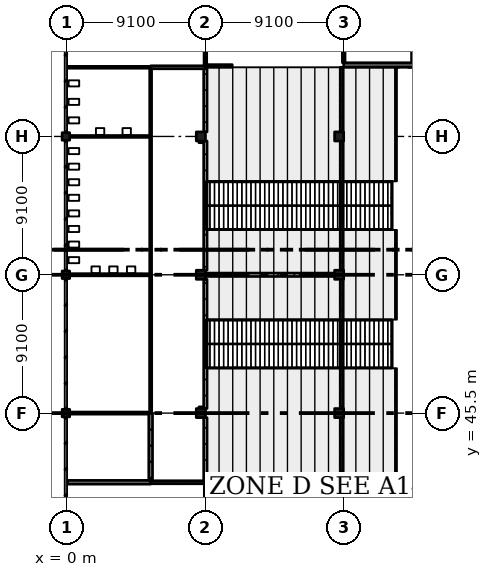
"""IFC4 building model, lengths in metres.
Left out: names, types, materials, properties, quantities, classifications, styles, units other than length and angle.
Written with IfcOpenShell. Run it as: python <this file> out.ifc"""

import sys

from ifc_helpers import new_model, si_unit, direction, frame, frame_2d, origin, origin_2d, place, context, subcontext, project, spatial, rectangle, extrude, element, fill, save


model = new_model("IFC4")
c1 = context("Model", 3, precision=1e-05, world=origin(), true_north=direction((0.0, 1.0)))
c2 = subcontext(c1, "Body", "Model", "MODEL_VIEW")
j1 = project(units=[si_unit("LENGTHUNIT", "METRE"), si_unit("PLANEANGLEUNIT", "RADIAN")], contexts=[c1])
p1 = place(None, origin())
s1 = spatial("IfcSite", under=j1, at=p1, CompositionType="ELEMENT")
p2 = place(p1, origin())
s2 = spatial("IfcBuilding", under=s1, at=p2, CompositionType="ELEMENT")
p3 = place(p2, frame((0.0, 0.0, 15.47)))
s3 = spatial("IfcBuildingStorey", under=s2, at=p3, CompositionType="ELEMENT", Elevation=15.47)
for number, where, z_axis, x_axis in (
    (1, (-0.075, 45.5, 0.0), (0.0, 0.0, 1.0), (1.0, 0.0, 0.0)),
    (2, (-0.075, 54.6, 0.0), (0.0, 0.0, 1.0), (1.0, 0.0, 0.0)),
    (3, (-0.075, 63.7, 0.0), (0.0, 0.0, 1.0), (1.0, 0.0, 0.0)),
):
    element("IfcColumn", number, at=place(p3, frame(where, z_axis=z_axis, x_axis=x_axis)), inside=s3, PredefinedType="COLUMN", context=c2, shape_type="SweptSolid", body=[
        extrude(rectangle(XDim=0.5, YDim=0.5, at=origin_2d()), origin(), (0.0, 0.0, 1.0), 4.55),
    ])
for number, where, z_axis, x_axis in (
    (4, (8.8, 45.5, 0.0), (0.0, 0.0, 1.0), (1.0, 0.0, 0.0)),
    (5, (8.8, 54.6, 0.0), (0.0, 0.0, 1.0), (1.0, 0.0, 0.0)),
    (6, (8.8, 63.7, 0.0), (0.0, 0.0, 1.0), (1.0, 0.0, 0.0)),
):
    element("IfcColumn", number, at=place(p3, frame(where, z_axis=z_axis, x_axis=x_axis)), inside=s3, PredefinedType="COLUMN", context=c2, shape_type="SweptSolid", body=[
        extrude(rectangle(XDim=0.6, YDim=0.6, at=origin_2d()), origin(), (0.0, 0.0, 1.0), 4.55),
    ])
for number, where, z_axis, x_axis in (
    (7, (17.9, 45.5, 0.0), (0.0, 0.0, 1.0), (1.0, 0.0, 0.0)),
    (8, (17.9, 54.6, 0.0), (0.0, 0.0, 1.0), (1.0, 0.0, 0.0)),
    (9, (17.9, 63.7, 0.0), (0.0, 0.0, 1.0), (1.0, 0.0, 0.0)),
):
    element("IfcColumn", number, at=place(p3, frame(where, z_axis=z_axis, x_axis=x_axis)), inside=s3, PredefinedType="COLUMN", context=c2, shape_type="SweptSolid", body=[
        extrude(rectangle(XDim=0.6, YDim=0.6, at=origin_2d()), origin(), (0.0, 0.0, 1.0), 2.71),
    ])
for number, where, z_axis, x_axis in (
    (10, (40.95, 40.8, 0.0), (0.0, 0.0, 1.0), (-1.0, 0.0, 0.0)),
    (11, (40.95, 68.4, 0.0), (0.0, 0.0, 1.0), (-1.0, 0.0, 0.0)),
):
    element("IfcWall", number, at=place(p3, frame(where, z_axis=z_axis, x_axis=x_axis)), inside=s3, PredefinedType="SHEAR", context=c2, shape_type="SweptSolid", body=[
        extrude(rectangle(XDim=22.75, YDim=0.3, at=frame_2d((11.375, 0.0))), origin(), (0.0, 0.0, 1.0), 4.55),
    ])
p4 = place(p3, frame((0.03, 40.95, 0.0), z_axis=(0.0, 0.0, 1.0), x_axis=(1.0, 0.0, 0.0)))
e12 = element("IfcWall", 12, at=p4, inside=s3, PredefinedType="SOLIDWALL", context=c2, shape_type="SweptSolid", body=[
    extrude(rectangle(XDim=5.47, YDim=0.25, at=frame_2d((2.735, 0.0))), origin(), (0.0, 0.0, 1.0), 4.3),
])
p5 = place(p3, frame((0.175, 45.5, 0.0), z_axis=(0.0, 0.0, 1.0), x_axis=(1.0, 0.0, 0.0)))
e13 = element("IfcWall", 13, at=p5, inside=s3, PredefinedType="SOLIDWALL", context=c2, shape_type="SweptSolid", body=[
    extrude(rectangle(XDim=5.2, YDim=0.14, at=frame_2d((2.6, 0.0))), origin(), (0.0, 0.0, 1.0), 3.6),
])
p6 = place(p3, frame((0.175, 54.6, 0.0), z_axis=(0.0, 0.0, 1.0), x_axis=(1.0, 0.0, 0.0)))
e14 = element("IfcWall", 14, at=p6, inside=s3, PredefinedType="SOLIDWALL", context=c2, shape_type="SweptSolid", body=[
    extrude(rectangle(XDim=5.255, YDim=0.14, at=frame_2d((2.627, 0.0))), origin(), (0.0, 0.0, 1.0), 3.6),
])
p7 = place(p3, frame((0.175, 63.7, 0.0), z_axis=(0.0, 0.0, 1.0), x_axis=(1.0, 0.0, 0.0)))
e15 = element("IfcWall", 15, at=p7, inside=s3, PredefinedType="PARTITIONING", context=c2, shape_type="SweptSolid", body=[
    extrude(rectangle(XDim=5.262, YDim=0.125, at=frame_2d((2.631, 0.0))), origin(), (0.0, 0.0, 1.0), 3.6),
])
p8 = place(p3, frame((5.5, 40.95, 0.0), z_axis=(0.0, 0.0, 1.0), x_axis=(1.0, 0.0, 0.0)))
e16 = element("IfcWall", 16, at=p8, inside=s3, PredefinedType="PARTITIONING", context=c2, shape_type="SweptSolid", body=[
    extrude(rectangle(XDim=3.6, YDim=0.2, at=frame_2d((1.8, 0.0))), origin(), (0.0, 0.0, 1.0), 4.3),
])
p9 = place(p8, frame((0.55, 0.0, 0.0)))
e17 = element("IfcOpeningElement", 17, at=p9, cuts=e16, PredefinedType="OPENING", context=c2, shape_type="SweptSolid", body=[
    extrude(rectangle(XDim=2.4, YDim=2.4, at=frame_2d((1.2, 1.2))), frame((0.0, 0.11, 0.0), z_axis=(0.0, -1.0, 0.0), x_axis=(1.0, 0.0, 0.0)), (0.0, 0.0, 1.0), 0.22),
])
p10 = place(p3, frame((5.5, 41.075, 0.0), z_axis=(0.0, 0.0, 1.0), x_axis=(0.0, 1.0, 0.0)))
e18 = element("IfcWall", 18, at=p10, inside=s3, PredefinedType="SOLIDWALL", context=c2, shape_type="SweptSolid", body=[
    extrude(rectangle(XDim=4.425, YDim=0.25, at=frame_2d((2.212, 0.0))), origin(), (0.0, 0.0, 1.0), 4.3),
])
p11 = place(p10, frame((1.75, 0.0, 0.0)))
e19 = element("IfcOpeningElement", 19, at=p11, cuts=e18, PredefinedType="OPENING", context=c2, shape_type="SweptSolid", body=[
    extrude(rectangle(XDim=1.0, YDim=2.1, at=frame_2d((0.5, 1.05))), frame((0.0, 0.135, 0.0), z_axis=(0.0, -1.0, 0.0), x_axis=(1.0, 0.0, 0.0)), (0.0, 0.0, 1.0), 0.27),
])
p12 = place(p3, frame((5.5, 45.5, 0.0), z_axis=(0.0, 0.0, 1.0), x_axis=(0.0, 1.0, 0.0)))
e20 = element("IfcWall", 20, at=p12, inside=s3, PredefinedType="SOLIDWALL", context=c2, shape_type="SweptSolid", body=[
    extrude(rectangle(XDim=9.1, YDim=0.14, at=frame_2d((4.55, 0.0))), origin(), (0.0, 0.0, 1.0), 4.3),
])
p13 = place(p12, frame((3.75, 0.0, 0.0)))
e21 = element("IfcOpeningElement", 21, at=p13, cuts=e20, PredefinedType="OPENING", context=c2, shape_type="SweptSolid", body=[
    extrude(rectangle(XDim=1.5, YDim=2.1, at=frame_2d((0.75, 1.05))), frame((0.0, 0.08, 0.0), z_axis=(0.0, -1.0, 0.0), x_axis=(1.0, 0.0, 0.0)), (0.0, 0.0, 1.0), 0.16),
])
p14 = place(p3, frame((5.5, 54.6, 0.0), z_axis=(0.0, 0.0, 1.0), x_axis=(0.0, 1.0, 0.0)))
e22 = element("IfcWall", 22, at=p14, inside=s3, PredefinedType="PARTITIONING", context=c2, shape_type="SweptSolid", body=[
    extrude(rectangle(XDim=13.55, YDim=0.125, at=frame_2d((6.775, 0.0))), origin(), (0.0, 0.0, 1.0), 4.3),
])
p15 = place(p14, frame((4.05, 0.0, 0.0)))
e23 = element("IfcOpeningElement", 23, at=p15, cuts=e22, PredefinedType="OPENING", context=c2, shape_type="SweptSolid", body=[
    extrude(rectangle(XDim=0.9, YDim=2.1, at=frame_2d((0.45, 1.05))), frame((0.0, 0.073, 0.0), z_axis=(0.0, -1.0, 0.0), x_axis=(1.0, 0.0, 0.0)), (0.0, 0.0, 1.0), 0.145),
])
p16 = place(p14, frame((10.85, 0.0, 0.0)))
e24 = element("IfcOpeningElement", 24, at=p16, cuts=e22, PredefinedType="OPENING", context=c2, shape_type="SweptSolid", body=[
    extrude(rectangle(XDim=0.9, YDim=2.1, at=frame_2d((0.45, 1.05))), frame((0.0, 0.073, 0.0), z_axis=(0.0, -1.0, 0.0), x_axis=(1.0, 0.0, 0.0)), (0.0, 0.0, 1.0), 0.145),
])
p17 = place(p3, frame((5.5, 68.25, 0.0), z_axis=(0.0, 0.0, 1.0), x_axis=(-1.0, 0.0, 0.0)))
e25 = element("IfcWall", 25, at=p17, inside=s3, PredefinedType="PARTITIONING", context=c2, shape_type="SweptSolid", body=[
    extrude(rectangle(XDim=5.47, YDim=0.125, at=frame_2d((2.735, 0.0))), origin(), (0.0, 0.0, 1.0), 4.3),
])
for number, where, z_axis, x_axis in (
    (26, (8.675, 63.4, 0.0), (0.0, 0.0, 1.0), (1.0, 0.0, 0.0)),
    (27, (8.975, 45.8, 0.0), (0.0, 0.0, 1.0), (-1.0, 0.0, 0.0)),
):
    element("IfcWall", number, at=place(p3, frame(where, z_axis=z_axis, x_axis=x_axis)), inside=s3, PredefinedType="PARTITIONING", context=c2, shape_type="SweptSolid", body=[
        extrude(rectangle(XDim=0.3, YDim=0.225, at=frame_2d((0.15, 0.0))), origin(), (0.0, 0.0, 1.0), 4.3),
    ])
p18 = place(p3, frame((9.1, 36.75, 0.0), z_axis=(0.0, 0.0, 1.0), x_axis=(0.0, 1.0, 0.0)))
e28 = element("IfcWall", 28, at=p18, inside=s3, PredefinedType="SOLIDWALL", context=c2, shape_type="SweptSolid", body=[
    extrude(rectangle(XDim=4.1, YDim=0.14, at=frame_2d((2.05, 0.0))), origin(), (0.0, 0.0, 1.0), 3.55),
])
p19 = place(p3, frame((9.1, 40.879, 0.0), z_axis=(0.0, 0.0, 1.0), x_axis=(1.0, 0.0, 0.0)))
e29 = element("IfcWall", 29, at=p19, inside=s3, PredefinedType="SOLIDWALL", context=c2, shape_type="SweptSolid", body=[
    extrude(rectangle(XDim=1.77, YDim=0.14, at=frame_2d((0.885, 0.0))), origin(), (0.0, 0.0, 1.0), 4.3),
])
p20 = place(p3, frame((9.1, 45.2, 0.0), z_axis=(0.0, 0.0, 1.0), x_axis=(0.0, -1.0, 0.0)))
e30 = element("IfcWall", 30, at=p20, inside=s3, PredefinedType="PARTITIONING", context=c2, shape_type="SweptSolid", body=[
    extrude(rectangle(XDim=4.15, YDim=0.225, at=frame_2d((2.075, 0.0))), origin(), (0.0, 0.0, 1.0), 3.55),
])
p21 = place(p3, frame((9.1, 54.3, 0.0), z_axis=(0.0, 0.0, 1.0), x_axis=(0.0, -1.0, 0.0)))
e31 = element("IfcWall", 31, at=p21, inside=s3, PredefinedType="PARTITIONING", context=c2, shape_type="SweptSolid", body=[
    extrude(rectangle(XDim=8.5, YDim=0.225, at=frame_2d((4.25, 0.0))), origin(), (0.0, 0.0, 1.0), 3.55),
])
p22 = place(p21, frame((3.75, 0.0, 0.0)))
e32 = element("IfcOpeningElement", 32, at=p22, cuts=e31, PredefinedType="OPENING", context=c2, shape_type="SweptSolid", body=[
    extrude(rectangle(XDim=1.0, YDim=2.4, at=frame_2d((0.5, 1.2))), frame((0.0, 0.123, 0.0), z_axis=(0.0, -1.0, 0.0), x_axis=(1.0, 0.0, 0.0)), (0.0, 0.0, 1.0), 0.245),
])
p23 = place(p3, frame((9.1, 54.6, 0.0), z_axis=(0.0, 0.0, 1.0), x_axis=(1.0, 0.0, 0.0)))
e33 = element("IfcWall", 33, at=p23, inside=s3, PredefinedType="PARTITIONING", context=c2, shape_type="SweptSolid", body=[
    extrude(rectangle(XDim=1.77, YDim=0.225, at=frame_2d((0.885, 0.0))), origin(), (0.0, 0.0, 1.0), 3.22),
])
p24 = place(p3, frame((9.1, 63.4, 0.0), z_axis=(0.0, 0.0, 1.0), x_axis=(0.0, -1.0, 0.0)))
e34 = element("IfcWall", 34, at=p24, inside=s3, PredefinedType="PARTITIONING", context=c2, shape_type="SweptSolid", body=[
    extrude(rectangle(XDim=8.5, YDim=0.225, at=frame_2d((4.25, 0.0))), origin(), (0.0, 0.0, 1.0), 3.55),
])
p25 = place(p24, frame((3.75, 0.0, 0.0)))
e35 = element("IfcOpeningElement", 35, at=p25, cuts=e34, PredefinedType="OPENING", context=c2, shape_type="SweptSolid", body=[
    extrude(rectangle(XDim=1.0, YDim=2.4, at=frame_2d((0.5, 1.2))), frame((0.0, 0.123, 0.0), z_axis=(0.0, -1.0, 0.0), x_axis=(1.0, 0.0, 0.0)), (0.0, 0.0, 1.0), 0.245),
])
p26 = place(p3, frame((9.1, 68.15, 0.0), z_axis=(0.0, 0.0, 1.0), x_axis=(0.0, -1.0, 0.0)))
e36 = element("IfcWall", 36, at=p26, inside=s3, PredefinedType="PARTITIONING", context=c2, shape_type="SweptSolid", body=[
    extrude(rectangle(XDim=4.15, YDim=0.225, at=frame_2d((2.075, 0.0))), origin(), (0.0, 0.0, 1.0), 3.55),
])
p27 = place(p3, frame((9.1, 68.25, 0.0), z_axis=(0.0, 0.0, 1.0), x_axis=(-1.0, 0.0, 0.0)))
e37 = element("IfcWall", 37, at=p27, inside=s3, PredefinedType="PARTITIONING", context=c2, shape_type="SweptSolid", body=[
    extrude(rectangle(XDim=3.6, YDim=0.2, at=frame_2d((1.8, 0.0))), origin(), (0.0, 0.0, 1.0), 4.3),
])
p28 = place(p27, frame((0.55, 0.0, 0.0)))
e38 = element("IfcOpeningElement", 38, at=p28, cuts=e37, PredefinedType="OPENING", context=c2, shape_type="SweptSolid", body=[
    extrude(rectangle(XDim=2.4, YDim=2.4, at=frame_2d((1.2, 1.2))), frame((0.0, 0.11, 0.0), z_axis=(0.0, -1.0, 0.0), x_axis=(1.0, 0.0, 0.0)), (0.0, 0.0, 1.0), 0.22),
])
p29 = place(p3, frame((9.1, 68.35, 0.0), z_axis=(0.0, 0.0, 1.0), x_axis=(0.0, 1.0, 0.0)))
e39 = element("IfcWall", 39, at=p29, inside=s3, PredefinedType="PARTITIONING", context=c2, shape_type="SweptSolid", body=[
    extrude(rectangle(XDim=4.1, YDim=0.175, at=frame_2d((2.05, 0.0))), origin(), (0.0, 0.0, 1.0), 3.55),
])
p30 = place(p3, frame((10.87, 68.338, 0.0), z_axis=(0.0, 0.0, 1.0), x_axis=(-1.0, 0.0, 0.0)))
e40 = element("IfcWall", 40, at=p30, inside=s3, PredefinedType="PARTITIONING", context=c2, shape_type="SweptSolid", body=[
    extrude(rectangle(XDim=1.77, YDim=0.175, at=frame_2d((0.885, 0.0))), origin(), (0.0, 0.0, 1.0), 4.3),
])
p31 = place(p3, frame((10.93, 54.6, 0.0), z_axis=(0.0, 0.0, 1.0), x_axis=(1.0, 0.0, 0.0)))
e41 = element("IfcWall", 41, at=p31, inside=s3, PredefinedType="PARTITIONING", context=c2, shape_type="SweptSolid", body=[
    extrude(rectangle(XDim=6.67, YDim=0.225, at=frame_2d((3.335, 0.0))), origin(), (0.0, 0.0, 1.0), 3.22),
])
p32 = place(p3, frame((18.2, 72.4, 0.0), z_axis=(0.0, 0.0, 1.0), x_axis=(0.0, -1.0, 0.0)))
e42 = element("IfcWall", 42, at=p32, inside=s3, PredefinedType="PARTITIONING", context=c2, shape_type="SweptSolid", body=[
    extrude(rectangle(XDim=3.85, YDim=0.175, at=frame_2d((1.925, 0.0))), origin(), (0.0, 0.0, 1.0), 4.3),
])
p33 = place(p3, frame((22.75, 40.65, 0.0), z_axis=(0.0, 0.0, 1.0), x_axis=(0.0, -1.0, 0.0)))
e43 = element("IfcWall", 43, at=p33, inside=s3, PredefinedType="SOLIDWALL", context=c2, shape_type="SweptSolid", body=[
    extrude(rectangle(XDim=4.25, YDim=0.14, at=frame_2d((2.125, 0.0))), origin(), (0.0, 0.0, 1.0), 4.3),
])
p34 = place(p3, frame((18.07, 54.3, 0.0), z_axis=(0.0, 0.0, 1.0), x_axis=(0.0, -1.0, 0.0)))
e44 = element("IfcWall", 44, at=p34, inside=s3, PredefinedType="PARTITIONING", context=c2, shape_type="SweptSolid", body=[
    extrude(rectangle(XDim=8.5, YDim=0.2, at=frame_2d((4.25, 0.0))), origin(), (0.0, 0.0, 1.0), 2.71),
])
p35 = place(p34, frame((1.25, 0.0, 1.1)))
e45 = element("IfcOpeningElement", 45, at=p35, cuts=e44, PredefinedType="OPENING", context=c2, shape_type="SweptSolid", body=[
    extrude(rectangle(XDim=6.0, YDim=1.3, at=frame_2d((3.0, 0.65))), frame((0.0, 0.11, 0.0), z_axis=(0.0, -1.0, 0.0), x_axis=(1.0, 0.0, 0.0)), (0.0, 0.0, 1.0), 0.22),
])
p36 = place(p3, frame((18.07, 45.2, 0.0), z_axis=(0.0, 0.0, 1.0), x_axis=(0.0, -1.0, 0.0)))
e46 = element("IfcWall", 46, at=p36, inside=s3, PredefinedType="PARTITIONING", context=c2, shape_type="SweptSolid", body=[
    extrude(rectangle(XDim=4.25, YDim=0.2, at=frame_2d((2.125, 0.0))), origin(), (0.0, 0.0, 1.0), 2.91),
])
p37 = place(p36, frame((1.125, 0.0, 1.1)))
e47 = element("IfcOpeningElement", 47, at=p37, cuts=e46, PredefinedType="OPENING", context=c2, shape_type="SweptSolid", body=[
    extrude(rectangle(XDim=2.0, YDim=1.3, at=frame_2d((1.0, 0.65))), frame((0.0, 0.11, 0.0), z_axis=(0.0, -1.0, 0.0), x_axis=(1.0, 0.0, 0.0)), (0.0, 0.0, 1.0), 0.22),
])
p38 = place(p3, frame((18.07, 68.25, 0.0), z_axis=(0.0, 0.0, 1.0), x_axis=(0.0, -1.0, 0.0)))
e48 = element("IfcWall", 48, at=p38, inside=s3, PredefinedType="PARTITIONING", context=c2, shape_type="SweptSolid", body=[
    extrude(rectangle(XDim=4.25, YDim=0.2, at=frame_2d((2.125, 0.0))), origin(), (0.0, 0.0, 1.0), 2.91),
])
p39 = place(p38, frame((1.125, 0.0, 1.1)))
e49 = element("IfcOpeningElement", 49, at=p39, cuts=e48, PredefinedType="OPENING", context=c2, shape_type="SweptSolid", body=[
    extrude(rectangle(XDim=2.0, YDim=1.3, at=frame_2d((1.0, 0.65))), frame((0.0, 0.11, 0.0), z_axis=(0.0, -1.0, 0.0), x_axis=(1.0, 0.0, 0.0)), (0.0, 0.0, 1.0), 0.22),
])
p40 = place(p3, frame((18.07, 63.4, 0.0), z_axis=(0.0, 0.0, 1.0), x_axis=(0.0, -1.0, 0.0)))
e50 = element("IfcWall", 50, at=p40, inside=s3, PredefinedType="PARTITIONING", context=c2, shape_type="SweptSolid", body=[
    extrude(rectangle(XDim=8.5, YDim=0.2, at=frame_2d((4.25, 0.0))), origin(), (0.0, 0.0, 1.0), 2.71),
])
p41 = place(p40, frame((1.25, 0.0, 1.1)))
e51 = element("IfcOpeningElement", 51, at=p41, cuts=e50, PredefinedType="OPENING", context=c2, shape_type="SweptSolid", body=[
    extrude(rectangle(XDim=6.0, YDim=1.3, at=frame_2d((3.0, 0.65))), frame((0.0, 0.11, 0.0), z_axis=(0.0, -1.0, 0.0), x_axis=(1.0, 0.0, 0.0)), (0.0, 0.0, 1.0), 0.22),
])
p42 = place(p3, frame((22.75, 73.0, 0.0), z_axis=(0.0, 0.0, 1.0), x_axis=(0.0, -1.0, 0.0)))
e52 = element("IfcWall", 52, at=p42, inside=s3, PredefinedType="PARTITIONING", context=c2, shape_type="SweptSolid", body=[
    extrude(rectangle(XDim=4.45, YDim=0.175, at=frame_2d((2.225, 0.0))), origin(), (0.0, 0.0, 1.0), 4.3),
])
p43 = place(p35, origin())
e53 = element("IfcWindow", 53, at=p43, inside=s3, PartitioningType="SINGLE_PANEL", PredefinedType="WINDOW", context=c2, shape_type="SweptSolid", body=[
    extrude(rectangle(XDim=6.0, YDim=1.3, at=frame_2d((3.0, 0.65))), frame((0.0, 0.03, 0.0), z_axis=(0.0, -1.0, 0.0), x_axis=(1.0, 0.0, 0.0)), (0.0, 0.0, 1.0), 0.06),
])
fill(e45, e53)
p44 = place(p37, origin())
e54 = element("IfcWindow", 54, at=p44, inside=s3, PartitioningType="SINGLE_PANEL", PredefinedType="WINDOW", context=c2, shape_type="SweptSolid", body=[
    extrude(rectangle(XDim=2.0, YDim=1.3, at=frame_2d((1.0, 0.65))), frame((0.0, 0.03, 0.0), z_axis=(0.0, -1.0, 0.0), x_axis=(1.0, 0.0, 0.0)), (0.0, 0.0, 1.0), 0.06),
])
fill(e47, e54)
p45 = place(p39, origin())
e55 = element("IfcWindow", 55, at=p45, inside=s3, PartitioningType="SINGLE_PANEL", PredefinedType="WINDOW", context=c2, shape_type="SweptSolid", body=[
    extrude(rectangle(XDim=2.0, YDim=1.3, at=frame_2d((1.0, 0.65))), frame((0.0, 0.03, 0.0), z_axis=(0.0, -1.0, 0.0), x_axis=(1.0, 0.0, 0.0)), (0.0, 0.0, 1.0), 0.06),
])
fill(e49, e55)
p46 = place(p41, origin())
e56 = element("IfcWindow", 56, at=p46, inside=s3, PartitioningType="SINGLE_PANEL", PredefinedType="WINDOW", context=c2, shape_type="SweptSolid", body=[
    extrude(rectangle(XDim=6.0, YDim=1.3, at=frame_2d((3.0, 0.65))), frame((0.0, 0.03, 0.0), z_axis=(0.0, -1.0, 0.0), x_axis=(1.0, 0.0, 0.0)), (0.0, 0.0, 1.0), 0.06),
])
fill(e51, e56)
p47 = place(p11, origin())
e57 = element("IfcDoor", 57, at=p47, inside=s3, OperationType="SINGLE_SWING_LEFT", PredefinedType="DOOR", context=c2, shape_type="SweptSolid", body=[
    extrude(rectangle(XDim=1.0, YDim=2.1, at=frame_2d((0.5, 1.05))), frame((0.0, 0.025, 0.0), z_axis=(0.0, -1.0, 0.0), x_axis=(1.0, 0.0, 0.0)), (0.0, 0.0, 1.0), 0.05),
])
fill(e19, e57)
p48 = place(p13, origin())
e58 = element("IfcDoor", 58, at=p48, inside=s3, OperationType="DOUBLE_DOOR_SINGLE_SWING", PredefinedType="DOOR", context=c2, shape_type="SweptSolid", body=[
    extrude(rectangle(XDim=1.5, YDim=2.1, at=frame_2d((0.75, 1.05))), frame((0.0, 0.025, 0.0), z_axis=(0.0, -1.0, 0.0), x_axis=(1.0, 0.0, 0.0)), (0.0, 0.0, 1.0), 0.05),
])
fill(e21, e58)
p49 = place(p15, origin())
e59 = element("IfcDoor", 59, at=p49, inside=s3, OperationType="SINGLE_SWING_RIGHT", PredefinedType="DOOR", context=c2, shape_type="SweptSolid", body=[
    extrude(rectangle(XDim=0.9, YDim=2.1, at=frame_2d((0.45, 1.05))), frame((0.0, 0.025, 0.0), z_axis=(0.0, -1.0, 0.0), x_axis=(1.0, 0.0, 0.0)), (0.0, 0.0, 1.0), 0.05),
])
fill(e23, e59)
p50 = place(p16, origin())
e60 = element("IfcDoor", 60, at=p50, inside=s3, OperationType="SINGLE_SWING_RIGHT", PredefinedType="DOOR", context=c2, shape_type="SweptSolid", body=[
    extrude(rectangle(XDim=0.9, YDim=2.1, at=frame_2d((0.45, 1.05))), frame((0.0, 0.025, 0.0), z_axis=(0.0, -1.0, 0.0), x_axis=(1.0, 0.0, 0.0)), (0.0, 0.0, 1.0), 0.05),
])
fill(e24, e60)
p51 = place(p22, origin())
e61 = element("IfcDoor", 61, at=p51, inside=s3, OperationType="SINGLE_SWING_RIGHT", PredefinedType="DOOR", context=c2, shape_type="SweptSolid", body=[
    extrude(rectangle(XDim=1.0, YDim=2.4, at=frame_2d((0.5, 1.2))), frame((0.0, 0.025, 0.0), z_axis=(0.0, -1.0, 0.0), x_axis=(1.0, 0.0, 0.0)), (0.0, 0.0, 1.0), 0.05),
])
fill(e32, e61)
p52 = place(p25, origin())
e62 = element("IfcDoor", 62, at=p52, inside=s3, OperationType="SINGLE_SWING_RIGHT", PredefinedType="DOOR", context=c2, shape_type="SweptSolid", body=[
    extrude(rectangle(XDim=1.0, YDim=2.4, at=frame_2d((0.5, 1.2))), frame((0.0, 0.025, 0.0), z_axis=(0.0, -1.0, 0.0), x_axis=(1.0, 0.0, 0.0)), (0.0, 0.0, 1.0), 0.05),
])
fill(e35, e62)
p53 = place(p9, origin())
e63 = element("IfcDoor", 63, at=p53, inside=s3, OperationType="DOUBLE_DOOR_SINGLE_SWING", PredefinedType="DOOR", context=c2, shape_type="SweptSolid", body=[
    extrude(rectangle(XDim=2.4, YDim=2.4, at=frame_2d((1.2, 1.2))), frame((0.0, 0.025, 0.0), z_axis=(0.0, -1.0, 0.0), x_axis=(1.0, 0.0, 0.0)), (0.0, 0.0, 1.0), 0.05),
])
fill(e17, e63)
p54 = place(p28, origin())
e64 = element("IfcDoor", 64, at=p54, inside=s3, OperationType="DOUBLE_DOOR_SINGLE_SWING", PredefinedType="DOOR", context=c2, shape_type="SweptSolid", body=[
    extrude(rectangle(XDim=2.4, YDim=2.4, at=frame_2d((1.2, 1.2))), frame((0.0, 0.025, 0.0), z_axis=(0.0, -1.0, 0.0), x_axis=(1.0, 0.0, 0.0)), (0.0, 0.0, 1.0), 0.05),
])
fill(e38, e64)
save(model, sys.argv[1])
